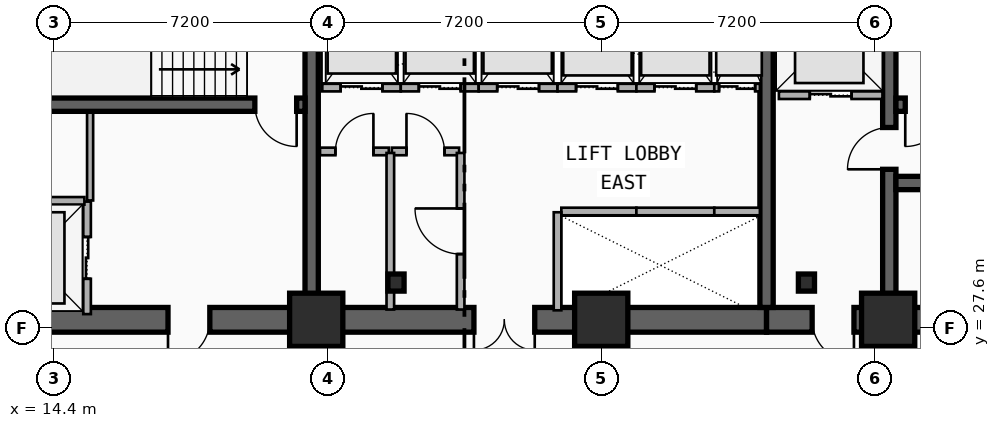
"""IFC4 building model, lengths in metres.
Left out: names, types, materials, properties, quantities, classifications, styles, units other than length and angle.
Written with IfcOpenShell. Run it as: python <this file> out.ifc"""

import sys

from ifc_helpers import new_model, si_unit, direction, frame, frame_2d, origin, origin_2d, place, context, subcontext, project, spatial, rectangle, i_section, extrude, element, fill, save


model = new_model("IFC4")
c1 = context("Model", 3, precision=1e-05, world=origin(), true_north=direction((0.0, 1.0)))
c2 = subcontext(c1, "Body", "Model", "MODEL_VIEW")
j1 = project(units=[si_unit("LENGTHUNIT", "METRE"), si_unit("PLANEANGLEUNIT", "RADIAN")], contexts=[c1])
p1 = place(None, origin())
s1 = spatial("IfcSite", under=j1, at=p1, CompositionType="ELEMENT")
p2 = place(p1, origin())
s2 = spatial("IfcBuilding", under=s1, at=p2, CompositionType="ELEMENT")
p3 = place(p2, frame((0.0, 0.0, 79.3)))
s3 = spatial("IfcBuildingStorey", under=s2, at=p3, CompositionType="ELEMENT", Elevation=79.3)
p4 = place(p3, frame((21.18, 27.82, 0.0), z_axis=(0.0, 0.0, 1.0), x_axis=(-1.0, 0.0, 0.0)))
e1 = element("IfcWall", 1, at=p4, inside=s3, PredefinedType="SHEAR", context=c2, shape_type="SweptSolid", body=[
    extrude(rectangle(XDim=9.03, YDim=0.65, at=frame_2d((4.515, 0.0))), origin(), (0.0, 0.0, 1.0), 3.5),
])
p5 = place(p4, frame((2.68, 0.0, 0.0)))
e2 = element("IfcOpeningElement", 2, at=p5, cuts=e1, PredefinedType="OPENING", context=c2, shape_type="SweptSolid", body=[
    extrude(rectangle(XDim=1.1, YDim=2.15, at=frame_2d((0.55, 1.075))), frame((0.0, 0.335, 0.0), z_axis=(0.0, -1.0, 0.0), x_axis=(1.0, 0.0, 0.0)), (0.0, 0.0, 1.0), 0.67),
])
p6 = place(p3, frame((33.15, 27.82, 0.0), z_axis=(0.0, 0.0, 1.0), x_axis=(-1.0, 0.0, 0.0)))
e3 = element("IfcWall", 3, at=p6, inside=s3, PredefinedType="SHEAR", context=c2, shape_type="SweptSolid", body=[
    extrude(rectangle(XDim=11.97, YDim=0.65, at=frame_2d((5.985, 0.0))), origin(), (0.0, 0.0, 1.0), 3.5),
])
p7 = place(p6, frame((6.1, 0.0, 0.0)))
e4 = element("IfcOpeningElement", 4, at=p7, cuts=e3, PredefinedType="OPENING", context=c2, shape_type="SweptSolid", body=[
    extrude(rectangle(XDim=1.6, YDim=2.2, at=frame_2d((0.8, 1.1))), frame((0.0, 0.335, 0.0), z_axis=(0.0, -1.0, 0.0), x_axis=(1.0, 0.0, 0.0)), (0.0, 0.0, 1.0), 0.67),
])
p8 = place(p3, frame((45.38, 27.82, 0.0), z_axis=(0.0, 0.0, 1.0), x_axis=(-1.0, 0.0, 0.0)))
e5 = element("IfcWall", 5, at=p8, inside=s3, PredefinedType="SHEAR", context=c2, shape_type="SweptSolid", body=[
    extrude(rectangle(XDim=12.23, YDim=0.65, at=frame_2d((6.115, 0.0))), origin(), (0.0, 0.0, 1.0), 3.5),
])
p9 = place(p8, frame((9.93, 0.0, 0.0)))
e6 = element("IfcOpeningElement", 6, at=p9, cuts=e5, PredefinedType="OPENING", context=c2, shape_type="SweptSolid", body=[
    extrude(rectangle(XDim=1.1, YDim=2.15, at=frame_2d((0.55, 1.075))), frame((0.0, 0.335, 0.0), z_axis=(0.0, -1.0, 0.0), x_axis=(1.0, 0.0, 0.0)), (0.0, 0.0, 1.0), 0.67),
])
p10 = place(p8, frame((6.23, 0.0, 0.0)))
e7 = element("IfcOpeningElement", 7, at=p10, cuts=e5, PredefinedType="OPENING", context=c2, shape_type="SweptSolid", body=[
    extrude(rectangle(XDim=1.1, YDim=2.15, at=frame_2d((0.55, 1.075))), frame((0.0, 0.335, 0.0), z_axis=(0.0, -1.0, 0.0), x_axis=(1.0, 0.0, 0.0)), (0.0, 0.0, 1.0), 0.67),
])
for number, where, z_axis, x_axis in (
    (8, (21.18, 28.145, 0.0), (0.0, 0.0, 1.0), (0.0, 1.0, 0.0)),
    (9, (33.15, 28.145, 0.0), (0.0, 0.0, 1.0), (0.0, 1.0, 0.0)),
):
    element("IfcWall", number, at=place(p3, frame(where, z_axis=z_axis, x_axis=x_axis)), inside=s3, PredefinedType="SHEAR", context=c2, shape_type="SweptSolid", body=[
        extrude(rectangle(XDim=8.58, YDim=0.35, at=frame_2d((4.29, 0.0))), origin(), (0.0, 0.0, 1.0), 3.5),
    ])
p11 = place(p3, frame((36.38, 28.145, 0.0), z_axis=(0.0, 0.0, 1.0), x_axis=(0.0, 1.0, 0.0)))
e10 = element("IfcWall", 10, at=p11, inside=s3, PredefinedType="SHEAR", context=c2, shape_type="SweptSolid", body=[
    extrude(rectangle(XDim=8.58, YDim=0.35, at=frame_2d((4.29, 0.0))), origin(), (0.0, 0.0, 1.0), 3.5),
])
p12 = place(p11, frame((3.635, 0.0, 0.0)))
e11 = element("IfcOpeningElement", 11, at=p12, cuts=e10, PredefinedType="OPENING", context=c2, shape_type="SweptSolid", body=[
    extrude(rectangle(XDim=1.1, YDim=2.15, at=frame_2d((0.55, 1.075))), frame((0.0, 0.185, 0.0), z_axis=(0.0, -1.0, 0.0), x_axis=(1.0, 0.0, 0.0)), (0.0, 0.0, 1.0), 0.37),
])
p13 = place(p3, frame((21.005, 33.48, 0.0), z_axis=(0.0, 0.0, 1.0), x_axis=(-1.0, 0.0, 0.0)))
e12 = element("IfcWall", 12, at=p13, inside=s3, PredefinedType="SHEAR", context=c2, shape_type="SweptSolid", body=[
    extrude(rectangle(XDim=8.53, YDim=0.35, at=frame_2d((4.265, 0.0))), origin(), (0.0, 0.0, 1.0), 3.5),
])
p14 = place(p13, frame((0.22, 0.0, 0.0)))
e13 = element("IfcOpeningElement", 13, at=p14, cuts=e12, PredefinedType="OPENING", context=c2, shape_type="SweptSolid", body=[
    extrude(rectangle(XDim=1.1, YDim=2.15, at=frame_2d((0.55, 1.075))), frame((0.0, 0.185, 0.0), z_axis=(0.0, -1.0, 0.0), x_axis=(1.0, 0.0, 0.0)), (0.0, 0.0, 1.0), 0.37),
])
p15 = place(p3, frame((45.055, 33.48, 0.0), z_axis=(0.0, 0.0, 1.0), x_axis=(-1.0, 0.0, 0.0)))
e14 = element("IfcWall", 14, at=p15, inside=s3, PredefinedType="SHEAR", context=c2, shape_type="SweptSolid", body=[
    extrude(rectangle(XDim=8.5, YDim=0.35, at=frame_2d((4.25, 0.0))), origin(), (0.0, 0.0, 1.0), 3.5),
])
p16 = place(p15, frame((7.155, 0.0, 0.0)))
e15 = element("IfcOpeningElement", 15, at=p16, cuts=e14, PredefinedType="OPENING", context=c2, shape_type="SweptSolid", body=[
    extrude(rectangle(XDim=1.1, YDim=2.15, at=frame_2d((0.55, 1.075))), frame((0.0, 0.185, 0.0), z_axis=(0.0, -1.0, 0.0), x_axis=(1.0, 0.0, 0.0)), (0.0, 0.0, 1.0), 0.37),
])
p17 = place(p3, frame((36.555, 31.42, 0.0), z_axis=(0.0, 0.0, 1.0), x_axis=(1.0, 0.0, 0.0)))
e16 = element("IfcWall", 16, at=p17, inside=s3, PredefinedType="SHEAR", context=c2, shape_type="SweptSolid", body=[
    extrude(rectangle(XDim=8.5, YDim=0.35, at=frame_2d((4.25, 0.0))), origin(), (0.0, 0.0, 1.0), 3.5),
])
for number, where, z_axis, x_axis in (
    (17, (23.4, 28.8, 0.0), (0.0, 0.0, 1.0), (1.0, 0.0, 0.0)),
    (18, (34.2, 28.8, 0.0), (0.0, 0.0, 1.0), (1.0, 0.0, 0.0)),
):
    element("IfcColumn", number, at=place(p3, frame(where, z_axis=z_axis, x_axis=x_axis)), inside=s3, PredefinedType="COLUMN", context=c2, shape_type="SweptSolid", body=[
        extrude(i_section(OverallWidth=0.424, OverallDepth=0.45, WebThickness=0.041, FlangeThickness=0.065, FilletRadius=0.015, at=origin_2d()), origin(), (0.0, 0.0, 1.0), 3.5),
    ])
for number, where, z_axis, x_axis in (
    (19, (21.3, 27.82, 0.0), (0.0, 0.0, 1.0), (1.0, 0.0, 0.0)),
    (20, (28.8, 27.82, 0.0), (0.0, 0.0, 1.0), (1.0, 0.0, 0.0)),
    (21, (36.35, 27.82, 0.0), (0.0, 0.0, 1.0), (1.0, 0.0, 0.0)),
):
    element("IfcColumn", number, at=place(p3, frame(where, z_axis=z_axis, x_axis=x_axis)), inside=s3, PredefinedType="COLUMN", context=c2, shape_type="SweptSolid", body=[
        extrude(rectangle(XDim=1.4, YDim=1.4, at=origin_2d()), origin(), (0.0, 0.0, 1.0), 3.5),
    ])
p18 = place(p3, frame((15.27, 27.97, 0.0), z_axis=(0.0, 0.0, 1.0), x_axis=(0.0, 1.0, 0.0)))
e22 = element("IfcWall", 22, at=p18, inside=s3, PredefinedType="PARTITIONING", context=c2, shape_type="SweptSolid", body=[
    extrude(rectangle(XDim=2.96, YDim=0.2, at=frame_2d((1.48, 0.0))), origin(), (0.0, 0.0, 1.0), 2.212),
])
p19 = place(p18, frame((0.93, 0.0, 0.0)))
e23 = element("IfcOpeningElement", 23, at=p19, cuts=e22, PredefinedType="OPENING", context=c2, shape_type="SweptSolid", body=[
    extrude(rectangle(XDim=1.1, YDim=2.15, at=frame_2d((0.55, 1.075))), frame((0.0, 0.11, 0.0), z_axis=(0.0, -1.0, 0.0), x_axis=(1.0, 0.0, 0.0)), (0.0, 0.0, 1.0), 0.22),
])
p20 = place(p3, frame((12.45, 30.95, 0.0), z_axis=(0.0, 0.0, 1.0), x_axis=(1.0, 0.0, 0.0)))
e24 = element("IfcWall", 24, at=p20, inside=s3, PredefinedType="PARTITIONING", context=c2, shape_type="SweptSolid", body=[
    extrude(rectangle(XDim=2.75, YDim=0.2, at=frame_2d((1.375, 0.0))), origin(), (0.0, 0.0, 1.0), 2.212),
])
p21 = place(p3, frame((33.475, 33.73, 0.0), z_axis=(0.0, 0.0, 1.0), x_axis=(1.0, 0.0, 0.0)))
e25 = element("IfcWall", 25, at=p21, inside=s3, PredefinedType="PARTITIONING", context=c2, shape_type="SweptSolid", body=[
    extrude(rectangle(XDim=2.725, YDim=0.2, at=frame_2d((1.362, 0.0))), origin(), (0.0, 0.0, 1.0), 2.212),
])
p22 = place(p21, frame((0.812, 0.0, 0.0)))
e26 = element("IfcOpeningElement", 26, at=p22, cuts=e25, PredefinedType="OPENING", context=c2, shape_type="SweptSolid", body=[
    extrude(rectangle(XDim=1.1, YDim=2.15, at=frame_2d((0.55, 1.075))), frame((0.0, 0.11, 0.0), z_axis=(0.0, -1.0, 0.0), x_axis=(1.0, 0.0, 0.0)), (0.0, 0.0, 1.0), 0.22),
])
p23 = place(p3, frame((27.75, 30.67, 0.0), z_axis=(0.0, 0.0, 1.0), x_axis=(1.0, 0.0, 0.0)))
e27 = element("IfcWall", 27, at=p23, inside=s3, PredefinedType="PARTITIONING", context=c2, shape_type="SweptSolid", body=[
    extrude(rectangle(XDim=1.975, YDim=0.2, at=frame_2d((0.988, 0.0))), origin(), (0.0, 0.0, 1.0), 2.212),
])
p24 = place(p3, frame((27.65, 28.07, 0.0), z_axis=(0.0, 0.0, 1.0), x_axis=(0.0, 1.0, 0.0)))
e28 = element("IfcWall", 28, at=p24, inside=s3, PredefinedType="PARTITIONING", context=c2, shape_type="SweptSolid", body=[
    extrude(rectangle(XDim=2.58, YDim=0.2, at=frame_2d((1.29, 0.0))), origin(), (0.0, 0.0, 1.0), 2.212),
])
p25 = place(p3, frame((29.725, 30.67, 0.0), z_axis=(0.0, 0.0, 1.0), x_axis=(1.0, 0.0, 0.0)))
e29 = element("IfcWall", 29, at=p25, inside=s3, PredefinedType="PARTITIONING", context=c2, shape_type="SweptSolid", body=[
    extrude(rectangle(XDim=2.05, YDim=0.2, at=frame_2d((1.025, 0.0))), origin(), (0.0, 0.0, 1.0), 2.62),
])
p26 = place(p3, frame((31.775, 30.67, 0.0), z_axis=(0.0, 0.0, 1.0), x_axis=(1.0, 0.0, 0.0)))
e30 = element("IfcWall", 30, at=p26, inside=s3, PredefinedType="PARTITIONING", context=c2, shape_type="SweptSolid", body=[
    extrude(rectangle(XDim=1.2, YDim=0.2, at=frame_2d((0.6, 0.0))), origin(), (0.0, 0.0, 1.0), 2.62),
])
p27 = place(p3, frame((21.46, 33.93, 0.0), z_axis=(0.0, 0.0, 1.0), x_axis=(1.0, 0.0, 0.0)))
e31 = element("IfcWall", 31, at=p27, inside=s3, PredefinedType="PARTITIONING", context=c2, shape_type="SweptSolid", body=[
    extrude(rectangle(XDim=2.065, YDim=0.2, at=frame_2d((1.032, 0.0))), origin(), (0.0, 0.0, 1.0), 2.212),
])
p28 = place(p27, frame((0.482, 0.0, 0.0)))
e32 = element("IfcOpeningElement", 32, at=p28, cuts=e31, PredefinedType="OPENING", context=c2, shape_type="SweptSolid", body=[
    extrude(rectangle(XDim=1.1, YDim=2.15, at=frame_2d((0.55, 1.075))), frame((0.0, 0.11, 0.0), z_axis=(0.0, -1.0, 0.0), x_axis=(1.0, 0.0, 0.0)), (0.0, 0.0, 1.0), 0.22),
])
p29 = place(p3, frame((23.525, 33.93, 0.0), z_axis=(0.0, 0.0, 1.0), x_axis=(1.0, 0.0, 0.0)))
e33 = element("IfcWall", 33, at=p29, inside=s3, PredefinedType="PARTITIONING", context=c2, shape_type="SweptSolid", body=[
    extrude(rectangle(XDim=2.05, YDim=0.2, at=frame_2d((1.025, 0.0))), origin(), (0.0, 0.0, 1.0), 3.24),
])
p30 = place(p29, frame((0.475, 0.0, 0.0)))
e34 = element("IfcOpeningElement", 34, at=p30, cuts=e33, PredefinedType="OPENING", context=c2, shape_type="SweptSolid", body=[
    extrude(rectangle(XDim=1.1, YDim=2.15, at=frame_2d((0.55, 1.075))), frame((0.0, 0.11, 0.0), z_axis=(0.0, -1.0, 0.0), x_axis=(1.0, 0.0, 0.0)), (0.0, 0.0, 1.0), 0.22),
])
p31 = place(p3, frame((25.575, 33.93, 0.0), z_axis=(0.0, 0.0, 1.0), x_axis=(1.0, 0.0, 0.0)))
e35 = element("IfcWall", 35, at=p31, inside=s3, PredefinedType="PARTITIONING", context=c2, shape_type="SweptSolid", body=[
    extrude(rectangle(XDim=2.075, YDim=0.2, at=frame_2d((1.038, 0.0))), origin(), (0.0, 0.0, 1.0), 3.24),
])
p32 = place(p31, frame((0.488, 0.0, 0.0)))
e36 = element("IfcOpeningElement", 36, at=p32, cuts=e35, PredefinedType="OPENING", context=c2, shape_type="SweptSolid", body=[
    extrude(rectangle(XDim=1.1, YDim=2.15, at=frame_2d((0.55, 1.075))), frame((0.0, 0.11, 0.0), z_axis=(0.0, -1.0, 0.0), x_axis=(1.0, 0.0, 0.0)), (0.0, 0.0, 1.0), 0.22),
])
p33 = place(p3, frame((27.65, 33.93, 0.0), z_axis=(0.0, 0.0, 1.0), x_axis=(1.0, 0.0, 0.0)))
e37 = element("IfcWall", 37, at=p33, inside=s3, PredefinedType="PARTITIONING", context=c2, shape_type="SweptSolid", body=[
    extrude(rectangle(XDim=2.075, YDim=0.2, at=frame_2d((1.038, 0.0))), origin(), (0.0, 0.0, 1.0), 2.212),
])
p34 = place(p33, frame((0.488, 0.0, 0.0)))
e38 = element("IfcOpeningElement", 38, at=p34, cuts=e37, PredefinedType="OPENING", context=c2, shape_type="SweptSolid", body=[
    extrude(rectangle(XDim=1.1, YDim=2.15, at=frame_2d((0.55, 1.075))), frame((0.0, 0.11, 0.0), z_axis=(0.0, -1.0, 0.0), x_axis=(1.0, 0.0, 0.0)), (0.0, 0.0, 1.0), 0.22),
])
p35 = place(p3, frame((29.725, 33.93, 0.0), z_axis=(0.0, 0.0, 1.0), x_axis=(1.0, 0.0, 0.0)))
e39 = element("IfcWall", 39, at=p35, inside=s3, PredefinedType="PARTITIONING", context=c2, shape_type="SweptSolid", body=[
    extrude(rectangle(XDim=2.05, YDim=0.2, at=frame_2d((1.025, 0.0))), origin(), (0.0, 0.0, 1.0), 3.24),
])
p36 = place(p35, frame((0.475, 0.0, 0.0)))
e40 = element("IfcOpeningElement", 40, at=p36, cuts=e39, PredefinedType="OPENING", context=c2, shape_type="SweptSolid", body=[
    extrude(rectangle(XDim=1.1, YDim=2.15, at=frame_2d((0.55, 1.075))), frame((0.0, 0.11, 0.0), z_axis=(0.0, -1.0, 0.0), x_axis=(1.0, 0.0, 0.0)), (0.0, 0.0, 1.0), 0.22),
])
p37 = place(p3, frame((31.775, 33.93, 0.0), z_axis=(0.0, 0.0, 1.0), x_axis=(1.0, 0.0, 0.0)))
e41 = element("IfcWall", 41, at=p37, inside=s3, PredefinedType="PARTITIONING", context=c2, shape_type="SweptSolid", body=[
    extrude(rectangle(XDim=1.2, YDim=0.2, at=frame_2d((0.6, 0.0))), origin(), (0.0, 0.0, 1.0), 3.24),
])
p38 = place(p37, frame((0.125, 0.0, 0.0)))
e42 = element("IfcOpeningElement", 42, at=p38, cuts=e41, PredefinedType="OPENING", context=c2, shape_type="SweptSolid", body=[
    extrude(rectangle(XDim=0.95, YDim=2.15, at=frame_2d((0.475, 1.075))), frame((0.0, 0.11, 0.0), z_axis=(0.0, -1.0, 0.0), x_axis=(1.0, 0.0, 0.0)), (0.0, 0.0, 1.0), 0.22),
])
p39 = place(p3, frame((21.4, 32.25, 0.0), z_axis=(0.0, 0.0, 1.0), x_axis=(1.0, 0.0, 0.0)))
e43 = element("IfcWall", 43, at=p39, inside=s3, PredefinedType="PARTITIONING", context=c2, shape_type="SweptSolid", body=[
    extrude(rectangle(XDim=1.81, YDim=0.2, at=frame_2d((0.905, 0.0))), origin(), (0.0, 0.0, 1.0), 2.28),
])
p40 = place(p39, frame((0.405, 0.0, 0.0)))
e44 = element("IfcOpeningElement", 44, at=p40, cuts=e43, PredefinedType="OPENING", context=c2, shape_type="SweptSolid", body=[
    extrude(rectangle(XDim=1.0, YDim=2.15, at=frame_2d((0.5, 1.075))), frame((0.0, 0.11, 0.0), z_axis=(0.0, -1.0, 0.0), x_axis=(1.0, 0.0, 0.0)), (0.0, 0.0, 1.0), 0.22),
])
p41 = place(p3, frame((23.29, 32.25, 0.0), z_axis=(0.0, 0.0, 1.0), x_axis=(1.0, 0.0, 0.0)))
e45 = element("IfcWall", 45, at=p41, inside=s3, PredefinedType="PARTITIONING", context=c2, shape_type="SweptSolid", body=[
    extrude(rectangle(XDim=1.77, YDim=0.2, at=frame_2d((0.885, 0.0))), origin(), (0.0, 0.0, 1.0), 3.24),
])
p42 = place(p41, frame((0.385, 0.0, 0.0)))
e46 = element("IfcOpeningElement", 46, at=p42, cuts=e45, PredefinedType="OPENING", context=c2, shape_type="SweptSolid", body=[
    extrude(rectangle(XDim=1.0, YDim=2.15, at=frame_2d((0.5, 1.075))), frame((0.0, 0.11, 0.0), z_axis=(0.0, -1.0, 0.0), x_axis=(1.0, 0.0, 0.0)), (0.0, 0.0, 1.0), 0.22),
])
p43 = place(p3, frame((25.1, 28.09, 0.0), z_axis=(0.0, 0.0, 1.0), x_axis=(0.0, 1.0, 0.0)))
e47 = element("IfcWall", 47, at=p43, inside=s3, PredefinedType="PARTITIONING", context=c2, shape_type="SweptSolid", body=[
    extrude(rectangle(XDim=4.12, YDim=0.2, at=frame_2d((2.06, 0.0))), origin(), (0.0, 0.0, 1.0), 2.62),
])
p44 = place(p43, frame((1.46, 0.0, 0.0)))
e48 = element("IfcOpeningElement", 48, at=p44, cuts=e47, PredefinedType="OPENING", context=c2, shape_type="SweptSolid", body=[
    extrude(rectangle(XDim=1.2, YDim=2.15, at=frame_2d((0.6, 1.075))), frame((0.0, 0.11, 0.0), z_axis=(0.0, -1.0, 0.0), x_axis=(1.0, 0.0, 0.0)), (0.0, 0.0, 1.0), 0.22),
])
p45 = place(p3, frame((23.25, 28.09, 0.0), z_axis=(0.0, 0.0, 1.0), x_axis=(0.0, 1.0, 0.0)))
e49 = element("IfcWall", 49, at=p45, inside=s3, PredefinedType="PARTITIONING", context=c2, shape_type="SweptSolid", body=[
    extrude(rectangle(XDim=4.12, YDim=0.2, at=frame_2d((2.06, 0.0))), origin(), (0.0, 0.0, 1.0), 2.62),
])
p46 = place(p3, frame((15.35, 30.96, 0.0), z_axis=(0.0, 0.0, 1.0), x_axis=(0.0, 1.0, 0.0)))
e50 = element("IfcWall", 50, at=p46, inside=s3, PredefinedType="PARTITIONING", context=c2, shape_type="SweptSolid", body=[
    extrude(rectangle(XDim=2.31, YDim=0.16, at=frame_2d((1.155, 0.0))), origin(), (0.0, 0.0, 1.0), 3.24),
])
p47 = place(p19, origin())
e51 = element("IfcDoor", 51, at=p47, inside=s3, OperationType="DOUBLE_DOOR_SLIDING", PredefinedType="DOOR", context=c2, shape_type="SweptSolid", body=[
    extrude(rectangle(XDim=1.1, YDim=2.15, at=frame_2d((0.55, 1.075))), frame((0.0, 0.025, 0.0), z_axis=(0.0, -1.0, 0.0), x_axis=(1.0, 0.0, 0.0)), (0.0, 0.0, 1.0), 0.05),
])
fill(e23, e51)
p48 = place(p22, origin())
e52 = element("IfcDoor", 52, at=p48, inside=s3, OperationType="DOUBLE_DOOR_SLIDING", PredefinedType="DOOR", context=c2, shape_type="SweptSolid", body=[
    extrude(rectangle(XDim=1.1, YDim=2.15, at=frame_2d((0.55, 1.075))), frame((0.0, 0.025, 0.0), z_axis=(0.0, -1.0, 0.0), x_axis=(1.0, 0.0, 0.0)), (0.0, 0.0, 1.0), 0.05),
])
fill(e26, e52)
p49 = place(p28, origin())
e53 = element("IfcDoor", 53, at=p49, inside=s3, OperationType="DOUBLE_DOOR_SLIDING", PredefinedType="DOOR", context=c2, shape_type="SweptSolid", body=[
    extrude(rectangle(XDim=1.1, YDim=2.15, at=frame_2d((0.55, 1.075))), frame((0.0, 0.025, 0.0), z_axis=(0.0, -1.0, 0.0), x_axis=(1.0, 0.0, 0.0)), (0.0, 0.0, 1.0), 0.05),
])
fill(e32, e53)
p50 = place(p30, origin())
e54 = element("IfcDoor", 54, at=p50, inside=s3, OperationType="DOUBLE_DOOR_SLIDING", PredefinedType="DOOR", context=c2, shape_type="SweptSolid", body=[
    extrude(rectangle(XDim=1.1, YDim=2.15, at=frame_2d((0.55, 1.075))), frame((0.0, 0.025, 0.0), z_axis=(0.0, -1.0, 0.0), x_axis=(1.0, 0.0, 0.0)), (0.0, 0.0, 1.0), 0.05),
])
fill(e34, e54)
p51 = place(p32, origin())
e55 = element("IfcDoor", 55, at=p51, inside=s3, OperationType="DOUBLE_DOOR_SLIDING", PredefinedType="DOOR", context=c2, shape_type="SweptSolid", body=[
    extrude(rectangle(XDim=1.1, YDim=2.15, at=frame_2d((0.55, 1.075))), frame((0.0, 0.025, 0.0), z_axis=(0.0, -1.0, 0.0), x_axis=(1.0, 0.0, 0.0)), (0.0, 0.0, 1.0), 0.05),
])
fill(e36, e55)
p52 = place(p34, origin())
e56 = element("IfcDoor", 56, at=p52, inside=s3, OperationType="DOUBLE_DOOR_SLIDING", PredefinedType="DOOR", context=c2, shape_type="SweptSolid", body=[
    extrude(rectangle(XDim=1.1, YDim=2.15, at=frame_2d((0.55, 1.075))), frame((0.0, 0.025, 0.0), z_axis=(0.0, -1.0, 0.0), x_axis=(1.0, 0.0, 0.0)), (0.0, 0.0, 1.0), 0.05),
])
fill(e38, e56)
p53 = place(p36, origin())
e57 = element("IfcDoor", 57, at=p53, inside=s3, OperationType="DOUBLE_DOOR_SLIDING", PredefinedType="DOOR", context=c2, shape_type="SweptSolid", body=[
    extrude(rectangle(XDim=1.1, YDim=2.15, at=frame_2d((0.55, 1.075))), frame((0.0, 0.025, 0.0), z_axis=(0.0, -1.0, 0.0), x_axis=(1.0, 0.0, 0.0)), (0.0, 0.0, 1.0), 0.05),
])
fill(e40, e57)
p54 = place(p38, origin())
e58 = element("IfcDoor", 58, at=p54, inside=s3, OperationType="DOUBLE_DOOR_SLIDING", PredefinedType="DOOR", context=c2, shape_type="SweptSolid", body=[
    extrude(rectangle(XDim=0.95, YDim=2.15, at=frame_2d((0.475, 1.075))), frame((0.0, 0.025, 0.0), z_axis=(0.0, -1.0, 0.0), x_axis=(1.0, 0.0, 0.0)), (0.0, 0.0, 1.0), 0.05),
])
fill(e42, e58)
p55 = place(p14, origin())
e59 = element("IfcDoor", 59, at=p55, inside=s3, OperationType="SINGLE_SWING_LEFT", PredefinedType="DOOR", context=c2, shape_type="SweptSolid", body=[
    extrude(rectangle(XDim=1.1, YDim=2.15, at=frame_2d((0.55, 1.075))), frame((0.0, 0.025, 0.0), z_axis=(0.0, -1.0, 0.0), x_axis=(1.0, 0.0, 0.0)), (0.0, 0.0, 1.0), 0.05),
])
fill(e13, e59)
p56 = place(p5, origin())
e60 = element("IfcDoor", 60, at=p56, inside=s3, OperationType="SINGLE_SWING_RIGHT", PredefinedType="DOOR", context=c2, shape_type="SweptSolid", body=[
    extrude(rectangle(XDim=1.1, YDim=2.15, at=frame_2d((0.55, 1.075))), frame((0.0, 0.025, 0.0), z_axis=(0.0, -1.0, 0.0), x_axis=(1.0, 0.0, 0.0)), (0.0, 0.0, 1.0), 0.05),
])
fill(e2, e60)
p57 = place(p16, origin())
e61 = element("IfcDoor", 61, at=p57, inside=s3, OperationType="SINGLE_SWING_RIGHT", PredefinedType="DOOR", context=c2, shape_type="SweptSolid", body=[
    extrude(rectangle(XDim=1.1, YDim=2.15, at=frame_2d((0.55, 1.075))), frame((0.0, 0.025, 0.0), z_axis=(0.0, -1.0, 0.0), x_axis=(1.0, 0.0, 0.0)), (0.0, 0.0, 1.0), 0.05),
])
fill(e15, e61)
p58 = place(p12, origin())
e62 = element("IfcDoor", 62, at=p58, inside=s3, OperationType="SINGLE_SWING_LEFT", PredefinedType="DOOR", context=c2, shape_type="SweptSolid", body=[
    extrude(rectangle(XDim=1.1, YDim=2.15, at=frame_2d((0.55, 1.075))), frame((0.0, 0.025, 0.0), z_axis=(0.0, -1.0, 0.0), x_axis=(1.0, 0.0, 0.0)), (0.0, 0.0, 1.0), 0.05),
])
fill(e11, e62)
p59 = place(p9, origin())
e63 = element("IfcDoor", 63, at=p59, inside=s3, OperationType="SINGLE_SWING_LEFT", PredefinedType="DOOR", context=c2, shape_type="SweptSolid", body=[
    extrude(rectangle(XDim=1.1, YDim=2.15, at=frame_2d((0.55, 1.075))), frame((0.0, 0.025, 0.0), z_axis=(0.0, -1.0, 0.0), x_axis=(1.0, 0.0, 0.0)), (0.0, 0.0, 1.0), 0.05),
])
fill(e6, e63)
p60 = place(p7, origin())
e64 = element("IfcDoor", 64, at=p60, inside=s3, OperationType="SINGLE_SWING_LEFT", PredefinedType="DOOR", context=c2, shape_type="SweptSolid", body=[
    extrude(rectangle(XDim=1.6, YDim=2.2, at=frame_2d((0.8, 1.1))), frame((0.0, 0.025, 0.0), z_axis=(0.0, -1.0, 0.0), x_axis=(1.0, 0.0, 0.0)), (0.0, 0.0, 1.0), 0.05),
])
fill(e4, e64)
p61 = place(p40, origin())
e65 = element("IfcDoor", 65, at=p61, inside=s3, OperationType="SINGLE_SWING_RIGHT", PredefinedType="DOOR", context=c2, shape_type="SweptSolid", body=[
    extrude(rectangle(XDim=1.0, YDim=2.15, at=frame_2d((0.5, 1.075))), frame((0.0, 0.025, 0.0), z_axis=(0.0, -1.0, 0.0), x_axis=(1.0, 0.0, 0.0)), (0.0, 0.0, 1.0), 0.05),
])
fill(e44, e65)
p62 = place(p42, origin())
e66 = element("IfcDoor", 66, at=p62, inside=s3, OperationType="SINGLE_SWING_LEFT", PredefinedType="DOOR", context=c2, shape_type="SweptSolid", body=[
    extrude(rectangle(XDim=1.0, YDim=2.15, at=frame_2d((0.5, 1.075))), frame((0.0, 0.025, 0.0), z_axis=(0.0, -1.0, 0.0), x_axis=(1.0, 0.0, 0.0)), (0.0, 0.0, 1.0), 0.05),
])
fill(e46, e66)
p63 = place(p44, origin())
e67 = element("IfcDoor", 67, at=p63, inside=s3, OperationType="SINGLE_SWING_RIGHT", PredefinedType="DOOR", context=c2, shape_type="SweptSolid", body=[
    extrude(rectangle(XDim=1.2, YDim=2.15, at=frame_2d((0.6, 1.075))), frame((0.0, 0.025, 0.0), z_axis=(0.0, -1.0, 0.0), x_axis=(1.0, 0.0, 0.0)), (0.0, 0.0, 1.0), 0.05),
])
fill(e48, e67)
save(model, sys.argv[1])
